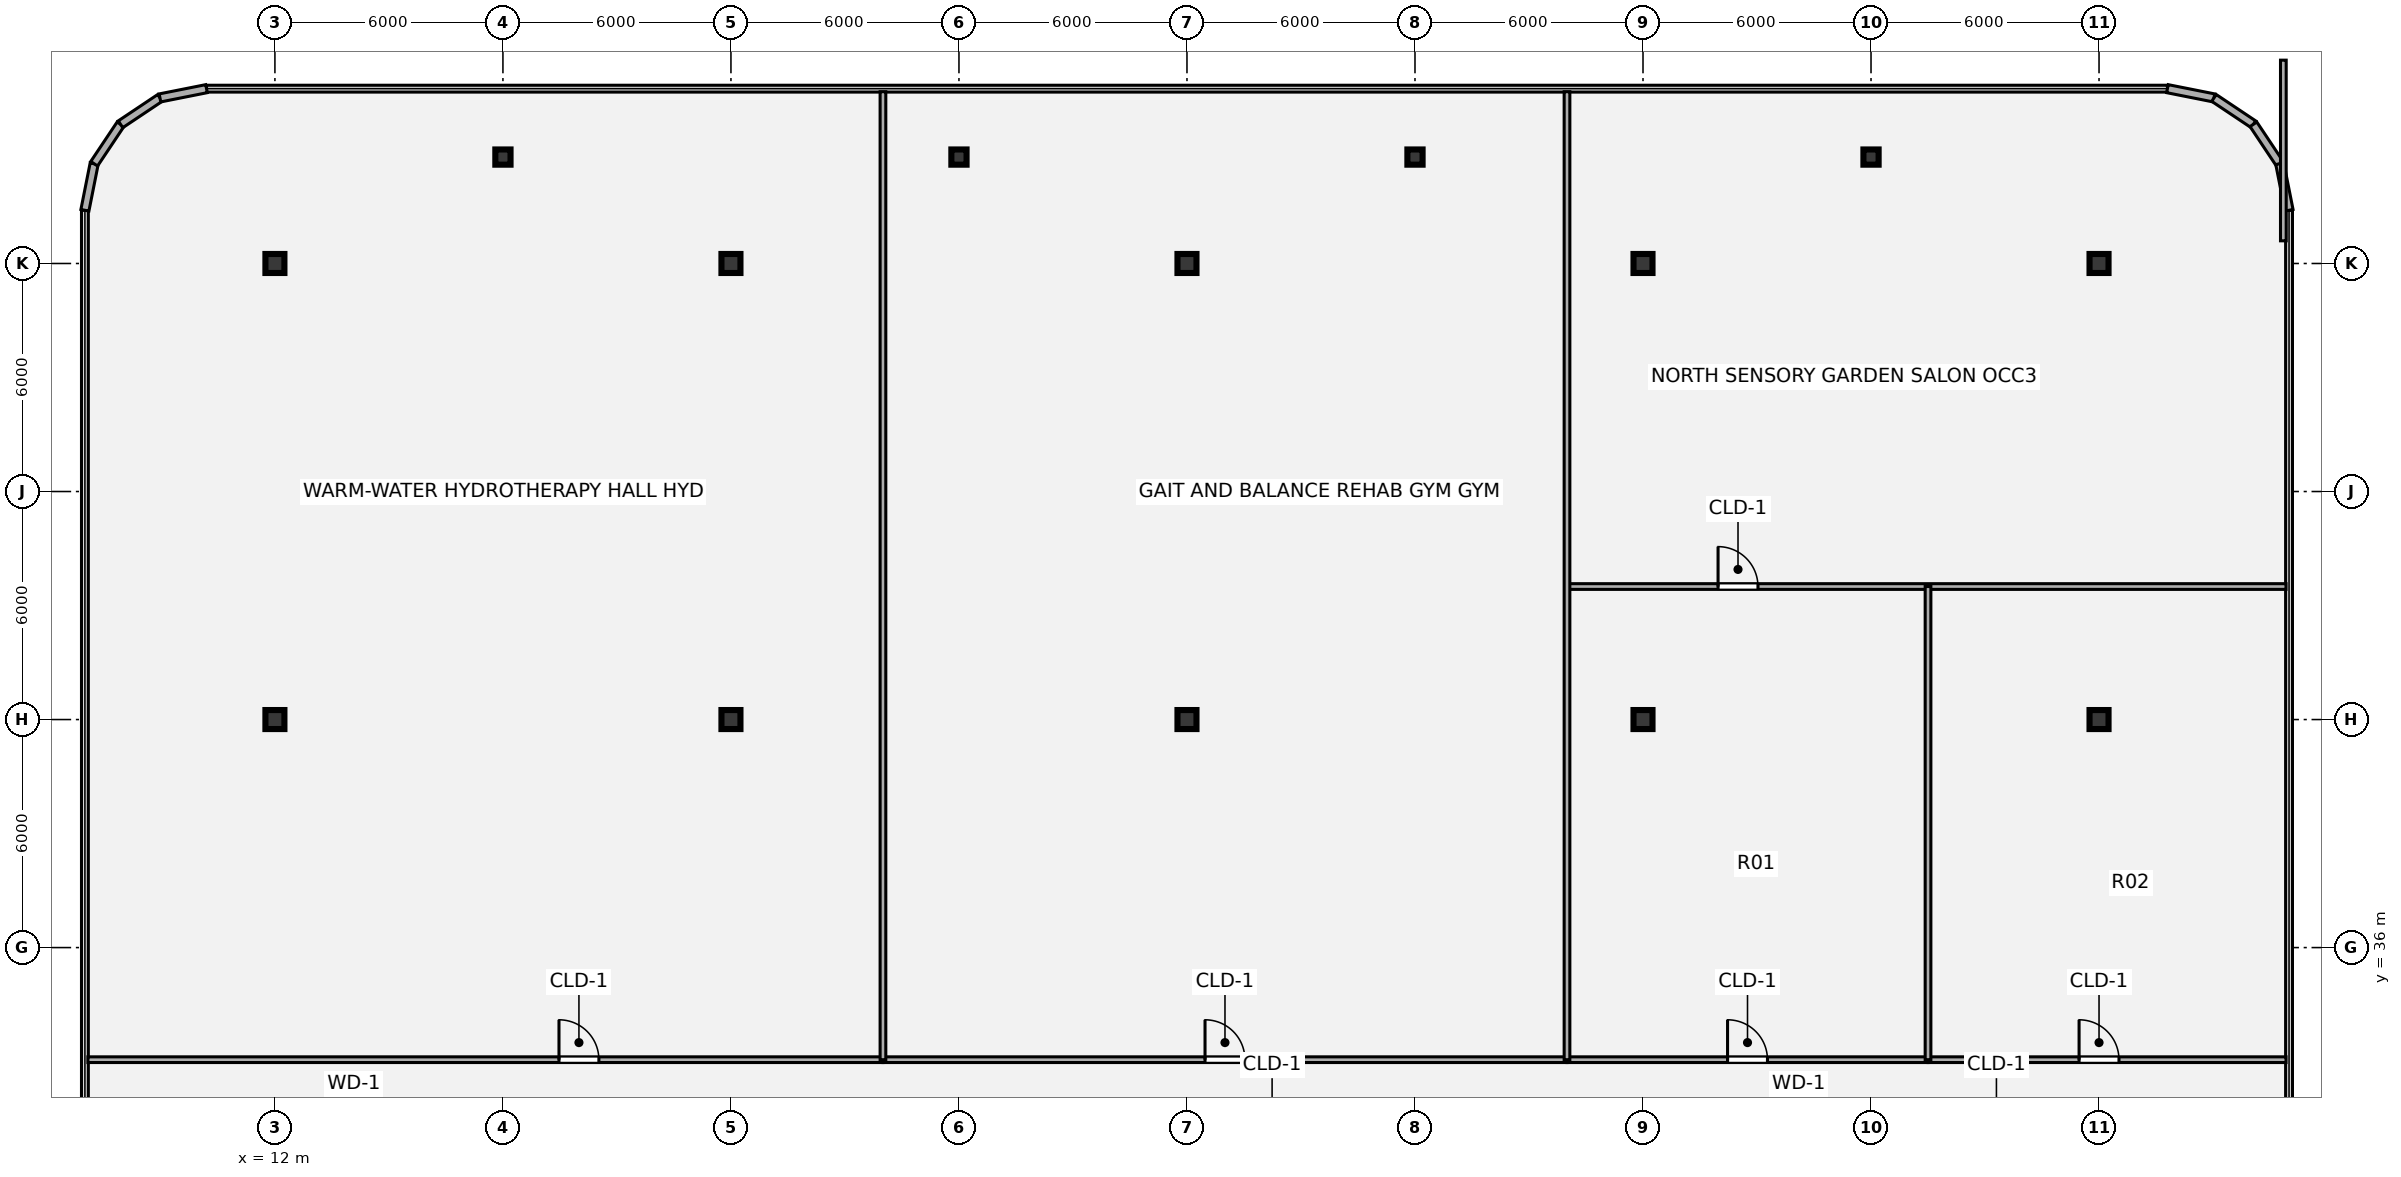
"""IFC4 building model, lengths in metres.
Left out: names, types, materials, properties, quantities, classifications, styles, units other than length and angle.
Written with IfcOpenShell. Run it as: python <this file> out.ifc"""

import sys

from ifc_helpers import new_model, si_unit, direction, frame, frame_2d, origin, origin_2d, place, context, subcontext, project, spatial, rectangle, i_section, extrude, source, transform, mapped, element, fill, save


model = new_model("IFC4")
c1 = context("Model", 3, precision=1e-05, world=origin(), true_north=direction((0.0, 1.0)))
c2 = subcontext(c1, "Body", "Model", "MODEL_VIEW")
j1 = project(units=[si_unit("LENGTHUNIT", "METRE"), si_unit("PLANEANGLEUNIT", "RADIAN")], contexts=[c1])
p1 = place(None, origin())
s1 = spatial("IfcSite", under=j1, at=p1, CompositionType="ELEMENT")
p2 = place(p1, origin())
s2 = spatial("IfcBuilding", under=s1, at=p2, CompositionType="ELEMENT")
p3 = place(p2, frame((0.0, 0.0, 14.04)))
s3 = spatial("IfcBuildingStorey", under=s2, at=p3, CompositionType="ELEMENT", Elevation=14.04)
m1 = source(origin(), c2, "Body", "SweptSolid", [
    extrude(i_section(OverallWidth=0.5, OverallDepth=0.5, WebThickness=0.022, FlangeThickness=0.035, at=origin_2d()), origin(), (0.0, 0.0, 1.0), 4.32),
])
for number, where, z_axis, x_axis in (
    (1, (12.0, 42.0, 0.0), (0.0, 0.0, 1.0), (1.0, 0.0, 0.0)),
    (2, (24.0, 42.0, 0.0), (0.0, 0.0, 1.0), (1.0, 0.0, 0.0)),
    (3, (36.0, 42.0, 0.0), (0.0, 0.0, 1.0), (1.0, 0.0, 0.0)),
    (4, (48.0, 42.0, 0.0), (0.0, 0.0, 1.0), (1.0, 0.0, 0.0)),
    (5, (60.0, 42.0, 0.0), (0.0, 0.0, 1.0), (1.0, 0.0, 0.0)),
    (6, (12.0, 54.0, 0.0), (0.0, 0.0, 1.0), (1.0, 0.0, 0.0)),
    (7, (24.0, 54.0, 0.0), (0.0, 0.0, 1.0), (1.0, 0.0, 0.0)),
    (8, (36.0, 54.0, 0.0), (0.0, 0.0, 1.0), (1.0, 0.0, 0.0)),
    (9, (48.0, 54.0, 0.0), (0.0, 0.0, 1.0), (1.0, 0.0, 0.0)),
    (10, (60.0, 54.0, 0.0), (0.0, 0.0, 1.0), (1.0, 0.0, 0.0)),
):
    element("IfcColumn", number, at=place(p3, frame(where, z_axis=z_axis, x_axis=x_axis)), inside=s3, PredefinedType="COLUMN", context=c2, shape_type="MappedRepresentation", body=[
        mapped(m1, transform((0.0, 0.0, 0.0), x_axis=(1.0, 0.0, 0.0), y_axis=(0.0, 1.0, 0.0), z_axis=(0.0, 0.0, 1.0), scale=1.0)),
    ])
m2 = source(origin(), c2, "Body", "SweptSolid", [
    extrude(i_section(OverallWidth=0.4, OverallDepth=0.4, WebThickness=0.022, FlangeThickness=0.035, at=origin_2d()), origin(), (0.0, 0.0, 1.0), 4.32),
])
for number, where, z_axis, x_axis in (
    (11, (18.0, 56.8, 0.0), (0.0, 0.0, 1.0), (1.0, 0.0, 0.0)),
    (12, (30.0, 56.8, 0.0), (0.0, 0.0, 1.0), (1.0, 0.0, 0.0)),
    (13, (42.0, 56.8, 0.0), (0.0, 0.0, 1.0), (1.0, 0.0, 0.0)),
    (14, (54.0, 56.8, 0.0), (0.0, 0.0, 1.0), (1.0, 0.0, 0.0)),
):
    element("IfcColumn", number, at=place(p3, frame(where, z_axis=z_axis, x_axis=x_axis)), inside=s3, PredefinedType="COLUMN", context=c2, shape_type="MappedRepresentation", body=[
        mapped(m2, transform((0.0, 0.0, 0.0), x_axis=(1.0, 0.0, 0.0), y_axis=(0.0, 1.0, 0.0), z_axis=(0.0, 0.0, 1.0), scale=1.0)),
    ])
for number, where, z_axis, x_axis in (
    (15, (7.0, 55.4, 0.0), (0.0, 0.0, 1.0), (0.195, 0.981, 0.0)),
    (16, (7.244, 56.625, 0.0), (0.0, 0.0, 1.0), (0.556, 0.831, 0.0)),
    (17, (7.937, 57.663, 0.0), (0.0, 0.0, 1.0), (0.831, 0.556, 0.0)),
    (18, (8.975, 58.356, 0.0), (0.0, 0.0, 1.0), (0.981, 0.195, 0.0)),
    (19, (61.8, 58.6, 0.0), (0.0, 0.0, 1.0), (0.981, -0.195, 0.0)),
    (20, (63.025, 58.356, 0.0), (0.0, 0.0, 1.0), (0.831, -0.556, 0.0)),
    (21, (64.063, 57.663, 0.0), (0.0, 0.0, 1.0), (0.556, -0.831, 0.0)),
    (22, (64.756, 56.625, 0.0), (0.0, 0.0, 1.0), (0.195, -0.981, 0.0)),
):
    element("IfcWall", number, at=place(p3, frame(where, z_axis=z_axis, x_axis=x_axis)), inside=s3, PredefinedType="SOLIDWALL", context=c2, shape_type="SweptSolid", body=[
        extrude(rectangle(XDim=1.249, YDim=0.215, at=frame_2d((0.624, 0.0))), origin(), (0.0, 0.0, 1.0), 4.04),
    ])
p4 = place(p3, frame((7.08, 33.05, 0.0), z_axis=(0.0, 0.0, 1.0), x_axis=(1.0, 0.0, 0.0)))
e23 = element("IfcWall", 23, at=p4, inside=s3, PredefinedType="PARTITIONING", context=c2, shape_type="SweptSolid", body=[
    extrude(rectangle(XDim=20.92, YDim=0.15, at=frame_2d((10.46, 0.0))), origin(), (0.0, 0.0, 1.0), 4.01),
])
p5 = place(p4, frame((12.395, 0.0, 0.0)))
e24 = element("IfcOpeningElement", 24, at=p5, cuts=e23, PredefinedType="OPENING", context=c2, shape_type="SweptSolid", body=[
    extrude(rectangle(XDim=1.05, YDim=2.1, at=origin_2d()), frame((0.525, 0.085, 1.05), z_axis=(0.0, -1.0, 0.0), x_axis=(1.0, 0.0, 0.0)), (0.0, 0.0, 1.0), 0.17),
])
p6 = place(p3, frame((28.0, 33.05, 0.0), z_axis=(0.0, 0.0, 1.0), x_axis=(1.0, 0.0, 0.0)))
e25 = element("IfcWall", 25, at=p6, inside=s3, PredefinedType="PARTITIONING", context=c2, shape_type="SweptSolid", body=[
    extrude(rectangle(XDim=18.0, YDim=0.15, at=frame_2d((9.0, 0.0))), origin(), (0.0, 0.0, 1.0), 4.01),
])
p7 = place(p6, frame((8.475, 0.0, 0.0)))
e26 = element("IfcOpeningElement", 26, at=p7, cuts=e25, PredefinedType="OPENING", context=c2, shape_type="SweptSolid", body=[
    extrude(rectangle(XDim=1.05, YDim=2.1, at=origin_2d()), frame((0.525, 0.085, 1.05), z_axis=(0.0, -1.0, 0.0), x_axis=(1.0, 0.0, 0.0)), (0.0, 0.0, 1.0), 0.17),
])
p8 = place(p3, frame((46.0, 33.05, 0.0), z_axis=(0.0, 0.0, 1.0), x_axis=(1.0, 0.0, 0.0)))
e27 = element("IfcWall", 27, at=p8, inside=s3, PredefinedType="PARTITIONING", context=c2, shape_type="SweptSolid", body=[
    extrude(rectangle(XDim=9.5, YDim=0.15, at=frame_2d((4.75, 0.0))), origin(), (0.0, 0.0, 1.0), 4.01),
])
p9 = place(p8, frame((4.225, 0.0, 0.0)))
e28 = element("IfcOpeningElement", 28, at=p9, cuts=e27, PredefinedType="OPENING", context=c2, shape_type="SweptSolid", body=[
    extrude(rectangle(XDim=1.05, YDim=2.1, at=origin_2d()), frame((0.525, 0.085, 1.05), z_axis=(0.0, -1.0, 0.0), x_axis=(1.0, 0.0, 0.0)), (0.0, 0.0, 1.0), 0.17),
])
p10 = place(p3, frame((55.5, 33.05, 0.0), z_axis=(0.0, 0.0, 1.0), x_axis=(1.0, 0.0, 0.0)))
e29 = element("IfcWall", 29, at=p10, inside=s3, PredefinedType="PARTITIONING", context=c2, shape_type="SweptSolid", body=[
    extrude(rectangle(XDim=9.42, YDim=0.15, at=frame_2d((4.71, 0.0))), origin(), (0.0, 0.0, 1.0), 4.01),
])
p11 = place(p10, frame((3.975, 0.0, 0.0)))
e30 = element("IfcOpeningElement", 30, at=p11, cuts=e29, PredefinedType="OPENING", context=c2, shape_type="SweptSolid", body=[
    extrude(rectangle(XDim=1.05, YDim=2.1, at=origin_2d()), frame((0.525, 0.085, 1.05), z_axis=(0.0, -1.0, 0.0), x_axis=(1.0, 0.0, 0.0)), (0.0, 0.0, 1.0), 0.17),
])
p12 = place(p3, frame((46.0, 45.5, 0.0), z_axis=(0.0, 0.0, 1.0), x_axis=(1.0, 0.0, 0.0)))
e31 = element("IfcWall", 31, at=p12, inside=s3, PredefinedType="PARTITIONING", context=c2, shape_type="SweptSolid", body=[
    extrude(rectangle(XDim=18.92, YDim=0.15, at=frame_2d((9.46, 0.0))), origin(), (0.0, 0.0, 1.0), 4.01),
])
p13 = place(p12, frame((3.975, 0.0, 0.0)))
e32 = element("IfcOpeningElement", 32, at=p13, cuts=e31, PredefinedType="OPENING", context=c2, shape_type="SweptSolid", body=[
    extrude(rectangle(XDim=1.05, YDim=2.1, at=origin_2d()), frame((0.525, 0.085, 1.05), z_axis=(0.0, -1.0, 0.0), x_axis=(1.0, 0.0, 0.0)), (0.0, 0.0, 1.0), 0.17),
])
for number, where, z_axis, x_axis in (
    (33, (28.0, 33.05, 0.0), (0.0, 0.0, 1.0), (0.0, 1.0, 0.0)),
    (34, (46.0, 33.05, 0.0), (0.0, 0.0, 1.0), (0.0, 1.0, 0.0)),
):
    element("IfcWall", number, at=place(p3, frame(where, z_axis=z_axis, x_axis=x_axis)), inside=s3, PredefinedType="PARTITIONING", context=c2, shape_type="SweptSolid", body=[
        extrude(rectangle(XDim=25.47, YDim=0.15, at=frame_2d((12.735, 0.0))), origin(), (0.0, 0.0, 1.0), 3.666),
    ])
p14 = place(p3, frame((55.5, 33.05, 0.0), z_axis=(0.0, 0.0, 1.0), x_axis=(0.0, 1.0, 0.0)))
e35 = element("IfcWall", 35, at=p14, inside=s3, PredefinedType="PARTITIONING", context=c2, shape_type="SweptSolid", body=[
    extrude(rectangle(XDim=12.45, YDim=0.15, at=frame_2d((6.225, 0.0))), origin(), (0.0, 0.0, 1.0), 3.666),
])
p15 = place(p3, frame((64.85, 54.596, 0.0), z_axis=(0.0, 0.0, 1.0), x_axis=(0.0, 1.0, 0.0)))
e36 = element("IfcWall", 36, at=p15, inside=s3, PredefinedType="PARTITIONING", context=c2, shape_type="SweptSolid", body=[
    extrude(rectangle(XDim=4.754, YDim=0.15, at=frame_2d((2.377, 0.0))), origin(), (0.0, 0.0, 1.0), 4.01),
])
m3 = source(origin(), c2, "Body", "SweptSolid", [
    extrude(rectangle(XDim=1.05, YDim=2.1, at=origin_2d()), frame((0.525, 0.025, 1.05), z_axis=(0.0, -1.0, 0.0), x_axis=(1.0, 0.0, 0.0)), (0.0, 0.0, 1.0), 0.05),
])
p16 = place(p5, origin())
e37 = element("IfcDoor", 37, at=p16, inside=s3, OperationType="SINGLE_SWING_LEFT", PredefinedType="DOOR", context=c2, shape_type="MappedRepresentation", body=[
    mapped(m3, transform((0.0, 0.0, 0.0), x_axis=(1.0, 0.0, 0.0), y_axis=(0.0, 1.0, 0.0), z_axis=(0.0, 0.0, 1.0), scale=1.0)),
])
fill(e24, e37)
p17 = place(p7, origin())
e38 = element("IfcDoor", 38, at=p17, inside=s3, OperationType="SINGLE_SWING_LEFT", PredefinedType="DOOR", context=c2, shape_type="MappedRepresentation", body=[
    mapped(m3, transform((0.0, 0.0, 0.0), x_axis=(1.0, 0.0, 0.0), y_axis=(0.0, 1.0, 0.0), z_axis=(0.0, 0.0, 1.0), scale=1.0)),
])
fill(e26, e38)
p18 = place(p9, origin())
e39 = element("IfcDoor", 39, at=p18, inside=s3, OperationType="SINGLE_SWING_LEFT", PredefinedType="DOOR", context=c2, shape_type="MappedRepresentation", body=[
    mapped(m3, transform((0.0, 0.0, 0.0), x_axis=(1.0, 0.0, 0.0), y_axis=(0.0, 1.0, 0.0), z_axis=(0.0, 0.0, 1.0), scale=1.0)),
])
fill(e28, e39)
p19 = place(p11, origin())
e40 = element("IfcDoor", 40, at=p19, inside=s3, OperationType="SINGLE_SWING_LEFT", PredefinedType="DOOR", context=c2, shape_type="MappedRepresentation", body=[
    mapped(m3, transform((0.0, 0.0, 0.0), x_axis=(1.0, 0.0, 0.0), y_axis=(0.0, 1.0, 0.0), z_axis=(0.0, 0.0, 1.0), scale=1.0)),
])
fill(e30, e40)
p20 = place(p13, origin())
e41 = element("IfcDoor", 41, at=p20, inside=s3, OperationType="SINGLE_SWING_LEFT", PredefinedType="DOOR", context=c2, shape_type="MappedRepresentation", body=[
    mapped(m3, transform((0.0, 0.0, 0.0), x_axis=(1.0, 0.0, 0.0), y_axis=(0.0, 1.0, 0.0), z_axis=(0.0, 0.0, 1.0), scale=1.0)),
])
fill(e32, e41)
save(model, sys.argv[1])
